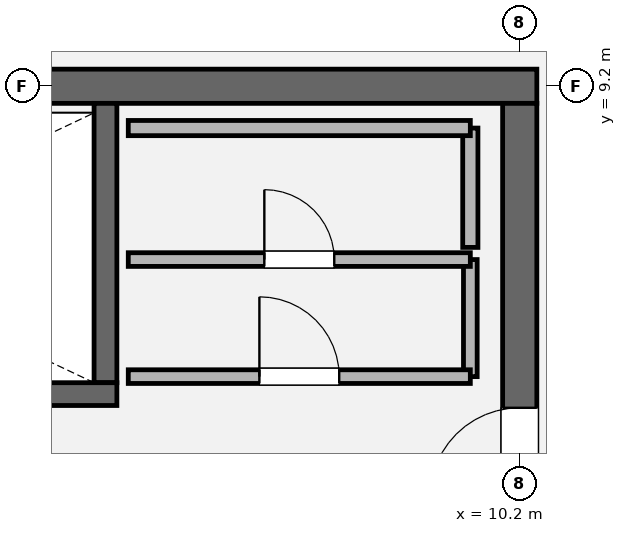
"""IFC4 building model, lengths in metres.
Left out: names, types, materials, properties, quantities, classifications, styles, units other than length and angle.
Written with IfcOpenShell. Run it as: python <this file> out.ifc"""

import sys

from ifc_helpers import new_model, si_unit, direction, frame, frame_2d, origin, place, context, subcontext, project, spatial, rectangle, extrude, element, fill, save


model = new_model("IFC4")
c1 = context("Model", 3, precision=1e-05, world=origin(), true_north=direction((0.0, 1.0)))
c2 = subcontext(c1, "Body", "Model", "MODEL_VIEW")
j1 = project(units=[si_unit("LENGTHUNIT", "METRE"), si_unit("PLANEANGLEUNIT", "RADIAN")], contexts=[c1])
p1 = place(None, origin())
s1 = spatial("IfcSite", under=j1, at=p1, CompositionType="ELEMENT")
p2 = place(p1, origin())
s2 = spatial("IfcBuilding", under=s1, at=p2, CompositionType="ELEMENT")
p3 = place(p2, frame((0.0, 0.0, 339.0)))
s3 = spatial("IfcBuildingStorey", under=s2, at=p3, CompositionType="ELEMENT", Elevation=339.0)
p4 = place(p3, frame((-10.425, 9.2, 0.0), z_axis=(0.0, 0.0, 1.0), x_axis=(1.0, 0.0, 0.0)))
e1 = element("IfcWall", 1, at=p4, inside=s3, PredefinedType="SHEAR", context=c2, shape_type="SweptSolid", body=[
    extrude(rectangle(XDim=20.85, YDim=0.45, at=frame_2d((10.425, 0.0))), origin(), (0.0, 0.0, 1.0), 4.8),
])
p5 = place(p3, frame((10.2, 8.975, 0.0), z_axis=(0.0, 0.0, 1.0), x_axis=(0.0, -1.0, 0.0)))
e2 = element("IfcWall", 2, at=p5, inside=s3, PredefinedType="SHEAR", context=c2, shape_type="SweptSolid", body=[
    extrude(rectangle(XDim=17.95, YDim=0.45, at=frame_2d((8.975, 0.0))), origin(), (0.0, 0.0, 1.0), 4.8),
])
p6 = place(p5, frame((4.005, 0.0, 0.0)))
e3 = element("IfcOpeningElement", 3, at=p6, cuts=e2, PredefinedType="OPENING", context=c2, shape_type="SweptSolid", body=[
    extrude(rectangle(XDim=1.18, YDim=2.2, at=frame_2d((0.59, 1.1))), frame((0.0, 0.235, 0.0), z_axis=(0.0, -1.0, 0.0), x_axis=(1.0, 0.0, 0.0)), (0.0, 0.0, 1.0), 0.47),
])
p7 = place(p3, frame((4.75, 8.975, 0.0), z_axis=(0.0, 0.0, 1.0), x_axis=(0.0, -1.0, 0.0)))
e4 = element("IfcWall", 4, at=p7, inside=s3, PredefinedType="SOLIDWALL", context=c2, shape_type="SweptSolid", body=[
    extrude(rectangle(XDim=3.675, YDim=0.3, at=frame_2d((1.837, 0.0))), origin(), (0.0, 0.0, 1.0), 4.8),
])
p8 = place(p3, frame((-4.9, 5.15, 0.0), z_axis=(0.0, 0.0, 1.0), x_axis=(1.0, 0.0, 0.0)))
e5 = element("IfcWall", 5, at=p8, inside=s3, PredefinedType="SOLIDWALL", context=c2, shape_type="SweptSolid", body=[
    extrude(rectangle(XDim=9.8, YDim=0.3, at=frame_2d((4.9, 0.0))), origin(), (0.0, 0.0, 1.0), 4.8),
])
p9 = place(p8, frame((0.56, 0.0, 0.0)))
e6 = element("IfcOpeningElement", 6, at=p9, cuts=e5, PredefinedType="OPENING", context=c2, shape_type="SweptSolid", body=[
    extrude(rectangle(XDim=1.18, YDim=2.2, at=frame_2d((0.59, 1.1))), frame((0.0, 0.16, 0.0), z_axis=(0.0, -1.0, 0.0), x_axis=(1.0, 0.0, 0.0)), (0.0, 0.0, 1.0), 0.32),
])
p10 = place(p3, frame((9.55, 5.38, 0.0), z_axis=(0.0, 0.0, 1.0), x_axis=(0.0, 1.0, 0.0)))
e7 = element("IfcWall", 7, at=p10, inside=s3, PredefinedType="PARTITIONING", context=c2, shape_type="SweptSolid", body=[
    extrude(rectangle(XDim=1.54, YDim=0.18, at=frame_2d((0.77, 0.0))), origin(), (0.0, 0.0, 1.0), 4.52),
])
p11 = place(p3, frame((9.55, 6.92, 0.0), z_axis=(0.0, 0.0, 1.0), x_axis=(-1.0, 0.0, 0.0)))
e8 = element("IfcWall", 8, at=p11, inside=s3, PredefinedType="PARTITIONING", context=c2, shape_type="SweptSolid", body=[
    extrude(rectangle(XDim=4.5, YDim=0.18, at=frame_2d((2.25, 0.0))), origin(), (0.0, 0.0, 1.0), 4.52),
])
p12 = place(p11, frame((1.79, 0.0, 0.0)))
e9 = element("IfcOpeningElement", 9, at=p12, cuts=e8, PredefinedType="OPENING", context=c2, shape_type="SweptSolid", body=[
    extrude(rectangle(XDim=0.92, YDim=2.1, at=frame_2d((0.46, 1.05))), frame((0.0, 0.1, 0.0), z_axis=(0.0, -1.0, 0.0), x_axis=(1.0, 0.0, 0.0)), (0.0, 0.0, 1.0), 0.2),
])
p13 = place(p3, frame((5.05, 5.38, 0.0), z_axis=(0.0, 0.0, 1.0), x_axis=(1.0, 0.0, 0.0)))
e10 = element("IfcWall", 10, at=p13, inside=s3, PredefinedType="PARTITIONING", context=c2, shape_type="SweptSolid", body=[
    extrude(rectangle(XDim=4.5, YDim=0.18, at=frame_2d((2.25, 0.0))), origin(), (0.0, 0.0, 1.0), 4.52),
])
p14 = place(p13, frame((1.725, 0.0, 0.0)))
e11 = element("IfcOpeningElement", 11, at=p14, cuts=e10, PredefinedType="OPENING", context=c2, shape_type="SweptSolid", body=[
    extrude(rectangle(XDim=1.05, YDim=2.2, at=frame_2d((0.525, 1.1))), frame((0.0, 0.1, 0.0), z_axis=(0.0, -1.0, 0.0), x_axis=(1.0, 0.0, 0.0)), (0.0, 0.0, 1.0), 0.2),
])
p15 = place(p3, frame((9.55, 7.08, 0.0), z_axis=(0.0, 0.0, 1.0), x_axis=(0.0, 1.0, 0.0)))
e12 = element("IfcWall", 12, at=p15, inside=s3, PredefinedType="SOLIDWALL", context=c2, shape_type="SweptSolid", body=[
    extrude(rectangle(XDim=1.57, YDim=0.2, at=frame_2d((0.785, 0.0))), origin(), (0.0, 0.0, 1.0), 4.52),
])
p16 = place(p3, frame((9.55, 8.65, 0.0), z_axis=(0.0, 0.0, 1.0), x_axis=(-1.0, 0.0, 0.0)))
e13 = element("IfcWall", 13, at=p16, inside=s3, PredefinedType="SOLIDWALL", context=c2, shape_type="SweptSolid", body=[
    extrude(rectangle(XDim=4.5, YDim=0.2, at=frame_2d((2.25, 0.0))), origin(), (0.0, 0.0, 1.0), 4.52),
])
p17 = place(p6, origin())
e14 = element("IfcDoor", 14, at=p17, inside=s3, OperationType="SINGLE_SWING_RIGHT", PredefinedType="DOOR", context=c2, shape_type="SweptSolid", body=[
    extrude(rectangle(XDim=1.18, YDim=2.2, at=frame_2d((0.59, 1.1))), frame((0.0, 0.025, 0.0), z_axis=(0.0, -1.0, 0.0), x_axis=(1.0, 0.0, 0.0)), (0.0, 0.0, 1.0), 0.05),
])
fill(e3, e14)
p18 = place(p14, origin())
e15 = element("IfcDoor", 15, at=p18, inside=s3, OperationType="SINGLE_SWING_LEFT", PredefinedType="DOOR", context=c2, shape_type="SweptSolid", body=[
    extrude(rectangle(XDim=1.05, YDim=2.2, at=frame_2d((0.525, 1.1))), frame((0.0, 0.025, 0.0), z_axis=(0.0, -1.0, 0.0), x_axis=(1.0, 0.0, 0.0)), (0.0, 0.0, 1.0), 0.05),
])
fill(e11, e15)
p19 = place(p12, origin())
e16 = element("IfcDoor", 16, at=p19, inside=s3, OperationType="SINGLE_SWING_RIGHT", PredefinedType="DOOR", context=c2, shape_type="SweptSolid", body=[
    extrude(rectangle(XDim=0.92, YDim=2.1, at=frame_2d((0.46, 1.05))), frame((0.0, 0.025, 0.0), z_axis=(0.0, -1.0, 0.0), x_axis=(1.0, 0.0, 0.0)), (0.0, 0.0, 1.0), 0.05),
])
fill(e9, e16)
save(model, sys.argv[1])
